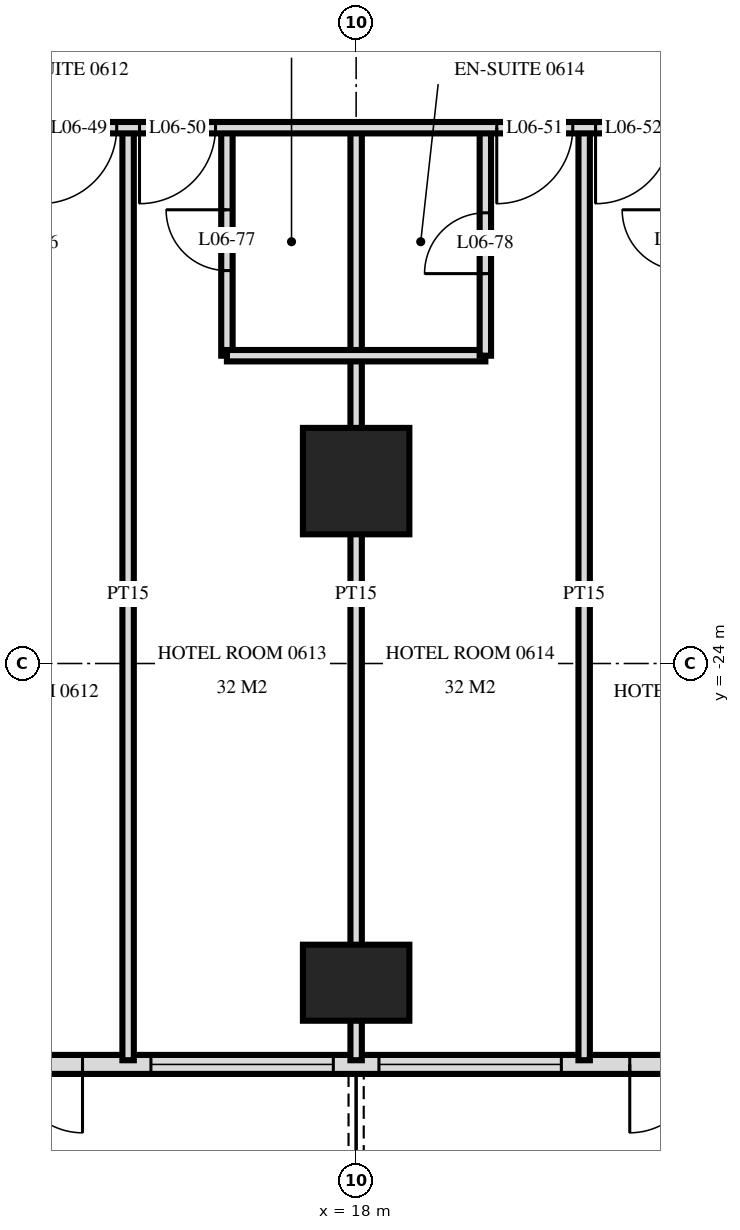
"""IFC4 building model, lengths in metres.
Left out: names, types, materials, properties, quantities, classifications, styles, units other than length and angle.
Written with IfcOpenShell. Run it as: python <this file> out.ifc"""

import sys

from ifc_helpers import new_model, si_unit, direction, frame, frame_2d, origin, origin_2d, place, context, subcontext, project, spatial, rectangle, extrude, element, fill, save


model = new_model("IFC4")
c1 = context("Model", 3, precision=1e-05, world=origin(), true_north=direction((0.0, 1.0)))
c2 = subcontext(c1, "Body", "Model", "MODEL_VIEW")
j1 = project(units=[si_unit("LENGTHUNIT", "METRE"), si_unit("PLANEANGLEUNIT", "RADIAN")], contexts=[c1])
p1 = place(None, origin())
s1 = spatial("IfcSite", under=j1, at=p1, CompositionType="ELEMENT")
p2 = place(p1, origin())
s2 = spatial("IfcBuilding", under=s1, at=p2, CompositionType="ELEMENT")
p3 = place(p2, frame((0.0, 0.0, 31.2)))
s3 = spatial("IfcBuildingStorey", under=s2, at=p3, CompositionType="ELEMENT", Elevation=31.2)
p4 = place(p3, frame((18.0, -28.2, 0.0), z_axis=(0.0, 0.0, 1.0), x_axis=(1.0, 0.0, 0.0)))
e1 = element("IfcColumn", 1, at=p4, inside=s3, PredefinedType="COLUMN", context=c2, shape_type="SweptSolid", body=[
    extrude(rectangle(XDim=1.4, YDim=1.0, at=origin_2d()), origin(), (0.0, 0.0, 1.0), 3.6),
])
p5 = place(p3, frame((18.0, -21.6, 0.0), z_axis=(0.0, 0.0, 1.0), x_axis=(1.0, 0.0, 0.0)))
e2 = element("IfcColumn", 2, at=p5, inside=s3, PredefinedType="COLUMN", context=c2, shape_type="SweptSolid", body=[
    extrude(rectangle(XDim=1.4, YDim=1.4, at=origin_2d()), origin(), (0.0, 0.0, 1.0), 3.6),
])
p6 = place(p3, frame((-28.775, -29.275, 0.0), z_axis=(0.0, 0.0, 1.0), x_axis=(1.0, 0.0, 0.0)))
e3 = element("IfcWall", 3, at=p6, inside=s3, PredefinedType="SOLIDWALL", context=c2, shape_type="SweptSolid", body=[
    extrude(rectangle(XDim=57.551, YDim=0.25, at=frame_2d((28.775, 0.0))), origin(), (0.0, 0.0, 1.0), 3.32),
])
p7 = place(p6, frame((0.575, 0.0, 0.0)))
e4 = element("IfcOpeningElement", 4, at=p7, cuts=e3, PredefinedType="OPENING", context=c2, shape_type="SweptSolid", body=[
    extrude(rectangle(XDim=1.8, YDim=2.4, at=frame_2d((0.9, 1.2))), frame((0.0, 0.135, 0.0), z_axis=(0.0, -1.0, 0.0), x_axis=(1.0, 0.0, 0.0)), (0.0, 0.0, 1.0), 0.27),
])
p8 = place(p6, frame((5.375, 0.0, 0.0)))
e5 = element("IfcOpeningElement", 5, at=p8, cuts=e3, PredefinedType="OPENING", context=c2, shape_type="SweptSolid", body=[
    extrude(rectangle(XDim=1.8, YDim=2.4, at=frame_2d((0.9, 1.2))), frame((0.0, 0.135, 0.0), z_axis=(0.0, -1.0, 0.0), x_axis=(1.0, 0.0, 0.0)), (0.0, 0.0, 1.0), 0.27),
])
p9 = place(p6, frame((8.075, 0.0, 0.3)))
e6 = element("IfcOpeningElement", 6, at=p9, cuts=e3, PredefinedType="OPENING", context=c2, shape_type="SweptSolid", body=[
    extrude(rectangle(XDim=2.4, YDim=2.1, at=frame_2d((1.2, 1.05))), frame((0.0, 0.135, 0.0), z_axis=(0.0, -1.0, 0.0), x_axis=(1.0, 0.0, 0.0)), (0.0, 0.0, 1.0), 0.27),
])
p10 = place(p6, frame((11.375, 0.0, 0.0)))
e7 = element("IfcOpeningElement", 7, at=p10, cuts=e3, PredefinedType="OPENING", context=c2, shape_type="SweptSolid", body=[
    extrude(rectangle(XDim=1.8, YDim=2.4, at=frame_2d((0.9, 1.2))), frame((0.0, 0.135, 0.0), z_axis=(0.0, -1.0, 0.0), x_axis=(1.0, 0.0, 0.0)), (0.0, 0.0, 1.0), 0.27),
])
p11 = place(p6, frame((14.075, 0.0, 0.3)))
e8 = element("IfcOpeningElement", 8, at=p11, cuts=e3, PredefinedType="OPENING", context=c2, shape_type="SweptSolid", body=[
    extrude(rectangle(XDim=2.4, YDim=2.1, at=frame_2d((1.2, 1.05))), frame((0.0, 0.135, 0.0), z_axis=(0.0, -1.0, 0.0), x_axis=(1.0, 0.0, 0.0)), (0.0, 0.0, 1.0), 0.27),
])
p12 = place(p6, frame((17.375, 0.0, 0.0)))
e9 = element("IfcOpeningElement", 9, at=p12, cuts=e3, PredefinedType="OPENING", context=c2, shape_type="SweptSolid", body=[
    extrude(rectangle(XDim=1.8, YDim=2.4, at=frame_2d((0.9, 1.2))), frame((0.0, 0.135, 0.0), z_axis=(0.0, -1.0, 0.0), x_axis=(1.0, 0.0, 0.0)), (0.0, 0.0, 1.0), 0.27),
])
p13 = place(p6, frame((20.075, 0.0, 0.3)))
e10 = element("IfcOpeningElement", 10, at=p13, cuts=e3, PredefinedType="OPENING", context=c2, shape_type="SweptSolid", body=[
    extrude(rectangle(XDim=2.4, YDim=2.1, at=frame_2d((1.2, 1.05))), frame((0.0, 0.135, 0.0), z_axis=(0.0, -1.0, 0.0), x_axis=(1.0, 0.0, 0.0)), (0.0, 0.0, 1.0), 0.27),
])
p14 = place(p6, frame((23.075, 0.0, 0.3)))
e11 = element("IfcOpeningElement", 11, at=p14, cuts=e3, PredefinedType="OPENING", context=c2, shape_type="SweptSolid", body=[
    extrude(rectangle(XDim=2.4, YDim=2.1, at=frame_2d((1.2, 1.05))), frame((0.0, 0.135, 0.0), z_axis=(0.0, -1.0, 0.0), x_axis=(1.0, 0.0, 0.0)), (0.0, 0.0, 1.0), 0.27),
])
p15 = place(p6, frame((26.375, 0.0, 0.0)))
e12 = element("IfcOpeningElement", 12, at=p15, cuts=e3, PredefinedType="OPENING", context=c2, shape_type="SweptSolid", body=[
    extrude(rectangle(XDim=1.8, YDim=2.4, at=frame_2d((0.9, 1.2))), frame((0.0, 0.135, 0.0), z_axis=(0.0, -1.0, 0.0), x_axis=(1.0, 0.0, 0.0)), (0.0, 0.0, 1.0), 0.27),
])
p16 = place(p6, frame((29.375, 0.0, 0.0)))
e13 = element("IfcOpeningElement", 13, at=p16, cuts=e3, PredefinedType="OPENING", context=c2, shape_type="SweptSolid", body=[
    extrude(rectangle(XDim=1.8, YDim=2.4, at=frame_2d((0.9, 1.2))), frame((0.0, 0.135, 0.0), z_axis=(0.0, -1.0, 0.0), x_axis=(1.0, 0.0, 0.0)), (0.0, 0.0, 1.0), 0.27),
])
p17 = place(p6, frame((32.075, 0.0, 0.3)))
e14 = element("IfcOpeningElement", 14, at=p17, cuts=e3, PredefinedType="OPENING", context=c2, shape_type="SweptSolid", body=[
    extrude(rectangle(XDim=2.4, YDim=2.1, at=frame_2d((1.2, 1.05))), frame((0.0, 0.135, 0.0), z_axis=(0.0, -1.0, 0.0), x_axis=(1.0, 0.0, 0.0)), (0.0, 0.0, 1.0), 0.27),
])
p18 = place(p6, frame((35.375, 0.0, 0.0)))
e15 = element("IfcOpeningElement", 15, at=p18, cuts=e3, PredefinedType="OPENING", context=c2, shape_type="SweptSolid", body=[
    extrude(rectangle(XDim=1.8, YDim=2.4, at=frame_2d((0.9, 1.2))), frame((0.0, 0.135, 0.0), z_axis=(0.0, -1.0, 0.0), x_axis=(1.0, 0.0, 0.0)), (0.0, 0.0, 1.0), 0.27),
])
p19 = place(p6, frame((38.075, 0.0, 0.3)))
e16 = element("IfcOpeningElement", 16, at=p19, cuts=e3, PredefinedType="OPENING", context=c2, shape_type="SweptSolid", body=[
    extrude(rectangle(XDim=2.4, YDim=2.1, at=frame_2d((1.2, 1.05))), frame((0.0, 0.135, 0.0), z_axis=(0.0, -1.0, 0.0), x_axis=(1.0, 0.0, 0.0)), (0.0, 0.0, 1.0), 0.27),
])
p20 = place(p6, frame((41.375, 0.0, 0.0)))
e17 = element("IfcOpeningElement", 17, at=p20, cuts=e3, PredefinedType="OPENING", context=c2, shape_type="SweptSolid", body=[
    extrude(rectangle(XDim=1.8, YDim=2.4, at=frame_2d((0.9, 1.2))), frame((0.0, 0.135, 0.0), z_axis=(0.0, -1.0, 0.0), x_axis=(1.0, 0.0, 0.0)), (0.0, 0.0, 1.0), 0.27),
])
p21 = place(p6, frame((44.075, 0.0, 0.3)))
e18 = element("IfcOpeningElement", 18, at=p21, cuts=e3, PredefinedType="OPENING", context=c2, shape_type="SweptSolid", body=[
    extrude(rectangle(XDim=2.4, YDim=2.1, at=frame_2d((1.2, 1.05))), frame((0.0, 0.135, 0.0), z_axis=(0.0, -1.0, 0.0), x_axis=(1.0, 0.0, 0.0)), (0.0, 0.0, 1.0), 0.27),
])
p22 = place(p6, frame((47.075, 0.0, 0.3)))
e19 = element("IfcOpeningElement", 19, at=p22, cuts=e3, PredefinedType="OPENING", context=c2, shape_type="SweptSolid", body=[
    extrude(rectangle(XDim=2.4, YDim=2.1, at=frame_2d((1.2, 1.05))), frame((0.0, 0.135, 0.0), z_axis=(0.0, -1.0, 0.0), x_axis=(1.0, 0.0, 0.0)), (0.0, 0.0, 1.0), 0.27),
])
p23 = place(p6, frame((50.375, 0.0, 0.0)))
e20 = element("IfcOpeningElement", 20, at=p23, cuts=e3, PredefinedType="OPENING", context=c2, shape_type="SweptSolid", body=[
    extrude(rectangle(XDim=1.8, YDim=2.4, at=frame_2d((0.9, 1.2))), frame((0.0, 0.135, 0.0), z_axis=(0.0, -1.0, 0.0), x_axis=(1.0, 0.0, 0.0)), (0.0, 0.0, 1.0), 0.27),
])
p24 = place(p6, frame((53.375, 0.0, 0.0)))
e21 = element("IfcOpeningElement", 21, at=p24, cuts=e3, PredefinedType="OPENING", context=c2, shape_type="SweptSolid", body=[
    extrude(rectangle(XDim=1.8, YDim=2.4, at=frame_2d((0.9, 1.2))), frame((0.0, 0.135, 0.0), z_axis=(0.0, -1.0, 0.0), x_axis=(1.0, 0.0, 0.0)), (0.0, 0.0, 1.0), 0.27),
])
p25 = place(p3, frame((21.0, -29.22, 0.0), z_axis=(0.0, 0.0, 1.0), x_axis=(0.0, 1.0, 0.0)))
e22 = element("IfcWall", 22, at=p25, inside=s3, PredefinedType="PARTITIONING", context=c2, shape_type="SweptSolid", body=[
    extrude(rectangle(XDim=12.27, YDim=0.15, at=frame_2d((6.135, 0.0))), origin(), (0.0, 0.0, 1.0), 3.32),
])
p26 = place(p3, frame((19.7, -19.95, 0.0), z_axis=(0.0, 0.0, 1.0), x_axis=(0.0, 1.0, 0.0)))
e23 = element("IfcWall", 23, at=p26, inside=s3, PredefinedType="PARTITIONING", context=c2, shape_type="SweptSolid", body=[
    extrude(rectangle(XDim=3.0, YDim=0.15, at=frame_2d((1.5, 0.0))), origin(), (0.0, 0.0, 1.0), 3.32),
])
p27 = place(p26, frame((1.08, 0.0, 0.0)))
e24 = element("IfcOpeningElement", 24, at=p27, cuts=e23, PredefinedType="OPENING", context=c2, shape_type="SweptSolid", body=[
    extrude(rectangle(XDim=0.8, YDim=2.1, at=frame_2d((0.4, 1.05))), frame((0.0, 0.085, 0.0), z_axis=(0.0, -1.0, 0.0), x_axis=(1.0, 0.0, 0.0)), (0.0, 0.0, 1.0), 0.17),
])
p28 = place(p3, frame((18.0, -29.22, 0.0), z_axis=(0.0, 0.0, 1.0), x_axis=(0.0, 1.0, 0.0)))
e25 = element("IfcWall", 25, at=p28, inside=s3, PredefinedType="PARTITIONING", context=c2, shape_type="SweptSolid", body=[
    extrude(rectangle(XDim=12.27, YDim=0.15, at=frame_2d((6.135, 0.0))), origin(), (0.0, 0.0, 1.0), 3.32),
])
p29 = place(p3, frame((16.3, -19.95, 0.0), z_axis=(0.0, 0.0, 1.0), x_axis=(0.0, 1.0, 0.0)))
e26 = element("IfcWall", 26, at=p29, inside=s3, PredefinedType="PARTITIONING", context=c2, shape_type="SweptSolid", body=[
    extrude(rectangle(XDim=3.0, YDim=0.15, at=frame_2d((1.5, 0.0))), origin(), (0.0, 0.0, 1.0), 3.32),
])
p30 = place(p29, frame((1.12, 0.0, 0.0)))
e27 = element("IfcOpeningElement", 27, at=p30, cuts=e26, PredefinedType="OPENING", context=c2, shape_type="SweptSolid", body=[
    extrude(rectangle(XDim=0.8, YDim=2.1, at=frame_2d((0.4, 1.05))), frame((0.0, 0.085, 0.0), z_axis=(0.0, -1.0, 0.0), x_axis=(1.0, 0.0, 0.0)), (0.0, 0.0, 1.0), 0.17),
])
p31 = place(p3, frame((15.0, -29.22, 0.0), z_axis=(0.0, 0.0, 1.0), x_axis=(0.0, 1.0, 0.0)))
e28 = element("IfcWall", 28, at=p31, inside=s3, PredefinedType="PARTITIONING", context=c2, shape_type="SweptSolid", body=[
    extrude(rectangle(XDim=12.27, YDim=0.15, at=frame_2d((6.135, 0.0))), origin(), (0.0, 0.0, 1.0), 3.32),
])
p32 = place(p3, frame((16.3, -19.95, 0.0), z_axis=(0.0, 0.0, 1.0), x_axis=(1.0, 0.0, 0.0)))
e29 = element("IfcWall", 29, at=p32, inside=s3, PredefinedType="PARTITIONING", context=c2, shape_type="SweptSolid", body=[
    extrude(rectangle(XDim=3.4, YDim=0.15, at=frame_2d((1.7, 0.0))), origin(), (0.0, 0.0, 1.0), 3.32),
])
p33 = place(p3, frame((-33.12, -16.95, 0.0), z_axis=(0.0, 0.0, 1.0), x_axis=(1.0, 0.0, 0.0)))
e30 = element("IfcWall", 30, at=p33, inside=s3, PredefinedType="PARTITIONING", context=c2, shape_type="SweptSolid", body=[
    extrude(rectangle(XDim=66.24, YDim=0.15, at=frame_2d((33.12, 0.0))), origin(), (0.0, 0.0, 1.0), 3.32),
])
p34 = place(p33, frame((9.27, 0.0, 0.0)))
e31 = element("IfcOpeningElement", 31, at=p34, cuts=e30, PredefinedType="OPENING", context=c2, shape_type="SweptSolid", body=[
    extrude(rectangle(XDim=1.0, YDim=2.1, at=frame_2d((0.5, 1.05))), frame((0.0, 0.085, 0.0), z_axis=(0.0, -1.0, 0.0), x_axis=(1.0, 0.0, 0.0)), (0.0, 0.0, 1.0), 0.17),
])
p35 = place(p33, frame((13.97, 0.0, 0.0)))
e32 = element("IfcOpeningElement", 32, at=p35, cuts=e30, PredefinedType="OPENING", context=c2, shape_type="SweptSolid", body=[
    extrude(rectangle(XDim=1.0, YDim=2.1, at=frame_2d((0.5, 1.05))), frame((0.0, 0.085, 0.0), z_axis=(0.0, -1.0, 0.0), x_axis=(1.0, 0.0, 0.0)), (0.0, 0.0, 1.0), 0.17),
])
p36 = place(p33, frame((15.27, 0.0, 0.0)))
e33 = element("IfcOpeningElement", 33, at=p36, cuts=e30, PredefinedType="OPENING", context=c2, shape_type="SweptSolid", body=[
    extrude(rectangle(XDim=1.0, YDim=2.1, at=frame_2d((0.5, 1.05))), frame((0.0, 0.085, 0.0), z_axis=(0.0, -1.0, 0.0), x_axis=(1.0, 0.0, 0.0)), (0.0, 0.0, 1.0), 0.17),
])
p37 = place(p33, frame((19.97, 0.0, 0.0)))
e34 = element("IfcOpeningElement", 34, at=p37, cuts=e30, PredefinedType="OPENING", context=c2, shape_type="SweptSolid", body=[
    extrude(rectangle(XDim=1.0, YDim=2.1, at=frame_2d((0.5, 1.05))), frame((0.0, 0.085, 0.0), z_axis=(0.0, -1.0, 0.0), x_axis=(1.0, 0.0, 0.0)), (0.0, 0.0, 1.0), 0.17),
])
p38 = place(p33, frame((22.27, 0.0, 0.0)))
e35 = element("IfcOpeningElement", 35, at=p38, cuts=e30, PredefinedType="OPENING", context=c2, shape_type="SweptSolid", body=[
    extrude(rectangle(XDim=1.0, YDim=2.1, at=frame_2d((0.5, 1.05))), frame((0.0, 0.085, 0.0), z_axis=(0.0, -1.0, 0.0), x_axis=(1.0, 0.0, 0.0)), (0.0, 0.0, 1.0), 0.17),
])
p39 = place(p33, frame((28.97, 0.0, 0.0)))
e36 = element("IfcOpeningElement", 36, at=p39, cuts=e30, PredefinedType="OPENING", context=c2, shape_type="SweptSolid", body=[
    extrude(rectangle(XDim=1.0, YDim=2.1, at=frame_2d((0.5, 1.05))), frame((0.0, 0.085, 0.0), z_axis=(0.0, -1.0, 0.0), x_axis=(1.0, 0.0, 0.0)), (0.0, 0.0, 1.0), 0.17),
])
p40 = place(p33, frame((30.27, 0.0, 0.0)))
e37 = element("IfcOpeningElement", 37, at=p40, cuts=e30, PredefinedType="OPENING", context=c2, shape_type="SweptSolid", body=[
    extrude(rectangle(XDim=1.0, YDim=2.1, at=frame_2d((0.5, 1.05))), frame((0.0, 0.085, 0.0), z_axis=(0.0, -1.0, 0.0), x_axis=(1.0, 0.0, 0.0)), (0.0, 0.0, 1.0), 0.17),
])
p41 = place(p33, frame((34.97, 0.0, 0.0)))
e38 = element("IfcOpeningElement", 38, at=p41, cuts=e30, PredefinedType="OPENING", context=c2, shape_type="SweptSolid", body=[
    extrude(rectangle(XDim=1.0, YDim=2.1, at=frame_2d((0.5, 1.05))), frame((0.0, 0.085, 0.0), z_axis=(0.0, -1.0, 0.0), x_axis=(1.0, 0.0, 0.0)), (0.0, 0.0, 1.0), 0.17),
])
p42 = place(p33, frame((36.27, 0.0, 0.0)))
e39 = element("IfcOpeningElement", 39, at=p42, cuts=e30, PredefinedType="OPENING", context=c2, shape_type="SweptSolid", body=[
    extrude(rectangle(XDim=1.0, YDim=2.1, at=frame_2d((0.5, 1.05))), frame((0.0, 0.085, 0.0), z_axis=(0.0, -1.0, 0.0), x_axis=(1.0, 0.0, 0.0)), (0.0, 0.0, 1.0), 0.17),
])
p43 = place(p33, frame((40.97, 0.0, 0.0)))
e40 = element("IfcOpeningElement", 40, at=p43, cuts=e30, PredefinedType="OPENING", context=c2, shape_type="SweptSolid", body=[
    extrude(rectangle(XDim=1.0, YDim=2.1, at=frame_2d((0.5, 1.05))), frame((0.0, 0.085, 0.0), z_axis=(0.0, -1.0, 0.0), x_axis=(1.0, 0.0, 0.0)), (0.0, 0.0, 1.0), 0.17),
])
p44 = place(p33, frame((42.27, 0.0, 0.0)))
e41 = element("IfcOpeningElement", 41, at=p44, cuts=e30, PredefinedType="OPENING", context=c2, shape_type="SweptSolid", body=[
    extrude(rectangle(XDim=1.0, YDim=2.1, at=frame_2d((0.5, 1.05))), frame((0.0, 0.085, 0.0), z_axis=(0.0, -1.0, 0.0), x_axis=(1.0, 0.0, 0.0)), (0.0, 0.0, 1.0), 0.17),
])
p45 = place(p33, frame((46.97, 0.0, 0.0)))
e42 = element("IfcOpeningElement", 42, at=p45, cuts=e30, PredefinedType="OPENING", context=c2, shape_type="SweptSolid", body=[
    extrude(rectangle(XDim=1.0, YDim=2.1, at=frame_2d((0.5, 1.05))), frame((0.0, 0.085, 0.0), z_axis=(0.0, -1.0, 0.0), x_axis=(1.0, 0.0, 0.0)), (0.0, 0.0, 1.0), 0.17),
])
p46 = place(p33, frame((48.27, 0.0, 0.0)))
e43 = element("IfcOpeningElement", 43, at=p46, cuts=e30, PredefinedType="OPENING", context=c2, shape_type="SweptSolid", body=[
    extrude(rectangle(XDim=1.0, YDim=2.1, at=frame_2d((0.5, 1.05))), frame((0.0, 0.085, 0.0), z_axis=(0.0, -1.0, 0.0), x_axis=(1.0, 0.0, 0.0)), (0.0, 0.0, 1.0), 0.17),
])
p47 = place(p33, frame((52.97, 0.0, 0.0)))
e44 = element("IfcOpeningElement", 44, at=p47, cuts=e30, PredefinedType="OPENING", context=c2, shape_type="SweptSolid", body=[
    extrude(rectangle(XDim=1.0, YDim=2.1, at=frame_2d((0.5, 1.05))), frame((0.0, 0.085, 0.0), z_axis=(0.0, -1.0, 0.0), x_axis=(1.0, 0.0, 0.0)), (0.0, 0.0, 1.0), 0.17),
])
p48 = place(p33, frame((54.27, 0.0, 0.0)))
e45 = element("IfcOpeningElement", 45, at=p48, cuts=e30, PredefinedType="OPENING", context=c2, shape_type="SweptSolid", body=[
    extrude(rectangle(XDim=1.0, YDim=2.1, at=frame_2d((0.5, 1.05))), frame((0.0, 0.085, 0.0), z_axis=(0.0, -1.0, 0.0), x_axis=(1.0, 0.0, 0.0)), (0.0, 0.0, 1.0), 0.17),
])
p49 = place(p33, frame((4.4, 0.0, 0.0)))
e46 = element("IfcOpeningElement", 46, at=p49, cuts=e30, PredefinedType="OPENING", context=c2, shape_type="SweptSolid", body=[
    extrude(rectangle(XDim=1.0, YDim=2.1, at=frame_2d((0.5, 1.05))), frame((0.0, 0.085, 0.0), z_axis=(0.0, -1.0, 0.0), x_axis=(1.0, 0.0, 0.0)), (0.0, 0.0, 1.0), 0.17),
])
p50 = place(p33, frame((60.8, 0.0, 0.0)))
e47 = element("IfcOpeningElement", 47, at=p50, cuts=e30, PredefinedType="OPENING", context=c2, shape_type="SweptSolid", body=[
    extrude(rectangle(XDim=1.0, YDim=2.1, at=frame_2d((0.5, 1.05))), frame((0.0, 0.085, 0.0), z_axis=(0.0, -1.0, 0.0), x_axis=(1.0, 0.0, 0.0)), (0.0, 0.0, 1.0), 0.17),
])
p51 = place(p20, frame((0.9, 0.0, 0.0), z_axis=(0.0, 0.0, 1.0), x_axis=(-1.0, 0.0, 0.0)))
e48 = element("IfcDoor", 48, at=p51, inside=s3, OperationType="DOUBLE_DOOR_SINGLE_SWING", PredefinedType="DOOR", context=c2, shape_type="SweptSolid", body=[
    extrude(rectangle(XDim=1.8, YDim=2.4, at=frame_2d((0.0, 1.2))), frame((0.0, -0.025, 0.0), z_axis=(0.0, 1.0, 0.0), x_axis=(-1.0, 0.0, 0.0)), (0.0, 0.0, 1.0), 0.05),
])
fill(e17, e48)
p52 = place(p21, origin())
e49 = element("IfcWindow", 49, at=p52, inside=s3, PartitioningType="SINGLE_PANEL", PredefinedType="WINDOW", context=c2, shape_type="SweptSolid", body=[
    extrude(rectangle(XDim=2.4, YDim=2.1, at=frame_2d((1.2, 1.05))), frame((0.0, 0.03, 0.0), z_axis=(0.0, -1.0, 0.0), x_axis=(1.0, 0.0, 0.0)), (0.0, 0.0, 1.0), 0.06),
])
fill(e18, e49)
p53 = place(p22, origin())
e50 = element("IfcWindow", 50, at=p53, inside=s3, PartitioningType="SINGLE_PANEL", PredefinedType="WINDOW", context=c2, shape_type="SweptSolid", body=[
    extrude(rectangle(XDim=2.4, YDim=2.1, at=frame_2d((1.2, 1.05))), frame((0.0, 0.03, 0.0), z_axis=(0.0, -1.0, 0.0), x_axis=(1.0, 0.0, 0.0)), (0.0, 0.0, 1.0), 0.06),
])
fill(e19, e50)
p54 = place(p23, frame((0.9, 0.0, 0.0), z_axis=(0.0, 0.0, 1.0), x_axis=(-1.0, 0.0, 0.0)))
e51 = element("IfcDoor", 51, at=p54, inside=s3, OperationType="DOUBLE_DOOR_SINGLE_SWING", PredefinedType="DOOR", context=c2, shape_type="SweptSolid", body=[
    extrude(rectangle(XDim=1.8, YDim=2.4, at=frame_2d((0.0, 1.2))), frame((0.0, -0.025, 0.0), z_axis=(0.0, 1.0, 0.0), x_axis=(-1.0, 0.0, 0.0)), (0.0, 0.0, 1.0), 0.05),
])
fill(e20, e51)
p55 = place(p45, frame((0.5, 0.0, 0.0), z_axis=(0.0, 0.0, 1.0), x_axis=(-1.0, 0.0, 0.0)))
e52 = element("IfcDoor", 52, at=p55, inside=s3, OperationType="SINGLE_SWING_LEFT", PredefinedType="DOOR", context=c2, shape_type="SweptSolid", body=[
    extrude(rectangle(XDim=1.0, YDim=2.1, at=frame_2d((0.0, 1.05))), frame((0.0, -0.025, 0.0), z_axis=(0.0, 1.0, 0.0), x_axis=(-1.0, 0.0, 0.0)), (0.0, 0.0, 1.0), 0.05),
])
fill(e42, e52)
p56 = place(p46, frame((0.5, 0.0, 0.0), z_axis=(0.0, 0.0, 1.0), x_axis=(-1.0, 0.0, 0.0)))
e53 = element("IfcDoor", 53, at=p56, inside=s3, OperationType="SINGLE_SWING_LEFT", PredefinedType="DOOR", context=c2, shape_type="SweptSolid", body=[
    extrude(rectangle(XDim=1.0, YDim=2.1, at=frame_2d((0.0, 1.05))), frame((0.0, -0.025, 0.0), z_axis=(0.0, 1.0, 0.0), x_axis=(-1.0, 0.0, 0.0)), (0.0, 0.0, 1.0), 0.05),
])
fill(e43, e53)
p57 = place(p47, frame((0.5, 0.0, 0.0), z_axis=(0.0, 0.0, 1.0), x_axis=(-1.0, 0.0, 0.0)))
e54 = element("IfcDoor", 54, at=p57, inside=s3, OperationType="SINGLE_SWING_LEFT", PredefinedType="DOOR", context=c2, shape_type="SweptSolid", body=[
    extrude(rectangle(XDim=1.0, YDim=2.1, at=frame_2d((0.0, 1.05))), frame((0.0, -0.025, 0.0), z_axis=(0.0, 1.0, 0.0), x_axis=(-1.0, 0.0, 0.0)), (0.0, 0.0, 1.0), 0.05),
])
fill(e44, e54)
p58 = place(p48, frame((0.5, 0.0, 0.0), z_axis=(0.0, 0.0, 1.0), x_axis=(-1.0, 0.0, 0.0)))
e55 = element("IfcDoor", 55, at=p58, inside=s3, OperationType="SINGLE_SWING_LEFT", PredefinedType="DOOR", context=c2, shape_type="SweptSolid", body=[
    extrude(rectangle(XDim=1.0, YDim=2.1, at=frame_2d((0.0, 1.05))), frame((0.0, -0.025, 0.0), z_axis=(0.0, 1.0, 0.0), x_axis=(-1.0, 0.0, 0.0)), (0.0, 0.0, 1.0), 0.05),
])
fill(e45, e55)
p59 = place(p30, origin())
e56 = element("IfcDoor", 56, at=p59, inside=s3, OperationType="SINGLE_SWING_LEFT", PredefinedType="DOOR", context=c2, shape_type="SweptSolid", body=[
    extrude(rectangle(XDim=0.8, YDim=2.1, at=frame_2d((0.4, 1.05))), frame((0.0, 0.025, 0.0), z_axis=(0.0, -1.0, 0.0), x_axis=(1.0, 0.0, 0.0)), (0.0, 0.0, 1.0), 0.05),
])
fill(e27, e56)
p60 = place(p27, origin())
e57 = element("IfcDoor", 57, at=p60, inside=s3, OperationType="SINGLE_SWING_RIGHT", PredefinedType="DOOR", context=c2, shape_type="SweptSolid", body=[
    extrude(rectangle(XDim=0.8, YDim=2.1, at=frame_2d((0.4, 1.05))), frame((0.0, 0.025, 0.0), z_axis=(0.0, -1.0, 0.0), x_axis=(1.0, 0.0, 0.0)), (0.0, 0.0, 1.0), 0.05),
])
fill(e24, e57)
save(model, sys.argv[1])
